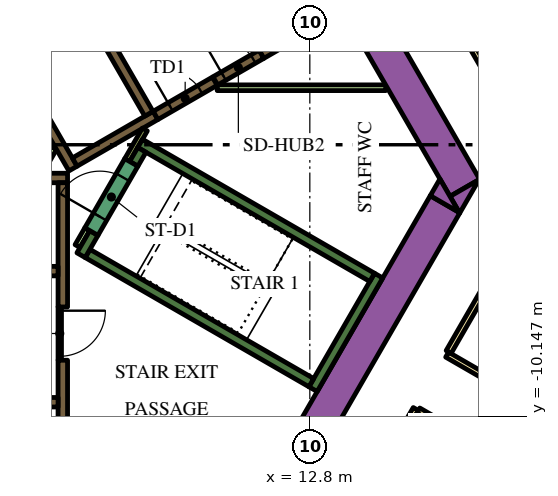
"""IFC4 building model, lengths in metres.
Left out: names, types, materials, properties, quantities, classifications, styles, units other than length and angle.
Written with IfcOpenShell. Run it as: python <this file> out.ifc"""

import sys

from ifc_helpers import new_model, si_unit, direction, frame, frame_2d, origin, place, context, subcontext, project, spatial, polyline, rectangle, outline, extrude, element, fill, save


model = new_model("IFC4")
c1 = context("Model", 3, precision=1e-05, world=origin(), true_north=direction((0.0, 1.0)))
c2 = subcontext(c1, "Body", "Model", "MODEL_VIEW")
j1 = project(units=[si_unit("LENGTHUNIT", "METRE"), si_unit("PLANEANGLEUNIT", "RADIAN")], contexts=[c1])
p1 = place(None, origin())
s1 = spatial("IfcSite", under=j1, at=p1, CompositionType="ELEMENT")
p2 = place(p1, origin())
s2 = spatial("IfcBuilding", under=s1, at=p2, CompositionType="ELEMENT")
p3 = place(p2, frame((0.0, 0.0, 91.5)))
s3 = spatial("IfcBuildingStorey", under=s2, at=p3, CompositionType="ELEMENT", Elevation=91.5)
p4 = place(p3, frame((6.776, 13.364, 0.0), z_axis=(0.0, 0.0, 1.0), x_axis=(0.500004177138, -0.8660229921, 0.0)))
e1 = element("IfcWall", 1, at=p4, inside=s3, PredefinedType="SOLIDWALL", context=c2, shape_type="SweptSolid", body=[
    extrude(rectangle(XDim=20.204, YDim=0.9, at=frame_2d((10.102, 0.0))), origin(), (0.0, 0.0, 1.0), 3.9),
])
p5 = place(p3, origin())
e2 = element("IfcWall", 2, at=p5, inside=s3, PredefinedType="SOLIDWALL", context=c2, shape_type="SweptSolid", body=[
    extrude(outline(polyline([(16.743, -4.8), (16.489, -4.36), (17.251, -3.92), (16.743, -4.8)])), origin(), (0.0, 0.0, 1.0), 3.9),
])
p6 = place(p3, frame((11.695, -12.644, 0.0), z_axis=(0.0, 0.0, 1.0), x_axis=(0.500010229568, 0.86601949766, 0.0)))
e3 = element("IfcWall", 3, at=p6, inside=s3, PredefinedType="SOLIDWALL", context=c2, shape_type="SweptSolid", body=[
    extrude(rectangle(XDim=9.326, YDim=0.9, at=frame_2d((4.663, 0.0))), origin(), (0.0, 0.0, 1.0), 3.9),
])
e4 = element("IfcWall", 4, at=p5, inside=s3, PredefinedType="SOLIDWALL", context=c2, shape_type="SweptSolid", body=[
    extrude(outline(polyline([(16.223, -3.9), (16.732, -4.78), (15.969, -4.34), (16.223, -3.9)])), origin(), (0.0, 0.0, 1.0), 3.9),
])
p7 = place(p3, frame((12.885, -9.431, 0.0), z_axis=(0.0, 0.0, 1.0), x_axis=(0.500020560727, 0.866013532718, 0.0)))
e5 = element("IfcWall", 5, at=p7, inside=s3, PredefinedType="SOLIDWALL", context=c2, shape_type="SweptSolid", body=[
    extrude(rectangle(XDim=3.45, YDim=0.25, at=frame_2d((1.725, 0.0))), origin(), (0.0, 0.0, 1.0), 3.9),
])
p8 = place(p3, frame((12.84, -9.261, 0.0), z_axis=(0.0, 0.0, 1.0), x_axis=(-0.866013990052, 0.500019768644, 0.0)))
e6 = element("IfcWall", 6, at=p8, inside=s3, PredefinedType="SOLIDWALL", context=c2, shape_type="SweptSolid", body=[
    extrude(rectangle(XDim=6.8, YDim=0.25, at=frame_2d((3.4, 0.0))), origin(), (0.0, 0.0, 1.0), 3.9),
])
p9 = place(p3, frame((6.78, -5.906, 0.0), z_axis=(0.0, 0.0, 1.0), x_axis=(0.500223362819, 0.865896406789, 0.0)))
e7 = element("IfcWall", 7, at=p9, inside=s3, PredefinedType="SOLIDWALL", context=c2, shape_type="SweptSolid", body=[
    extrude(rectangle(XDim=0.675, YDim=0.25, at=frame_2d((0.337, 0.0))), origin(), (0.0, 0.0, 1.0), 3.9),
])
p10 = place(p3, frame((8.334, -2.964, 0.0), z_axis=(0.0, 0.0, 1.0), x_axis=(0.866016039709, -0.500016218704, 0.0)))
e8 = element("IfcWall", 8, at=p10, inside=s3, PredefinedType="SOLIDWALL", context=c2, shape_type="SweptSolid", body=[
    extrude(rectangle(XDim=7.05, YDim=0.25, at=frame_2d((3.525, 0.0))), origin(), (0.0, 0.0, 1.0), 3.9),
])
p11 = place(p3, frame((8.168, -3.503, 0.0), z_axis=(0.0, 0.0, 1.0), x_axis=(0.49972245349, 0.866185586049, 0.0)))
e9 = element("IfcWall", 9, at=p11, inside=s3, PredefinedType="SOLIDWALL", context=c2, shape_type="SweptSolid", body=[
    extrude(rectangle(XDim=0.425, YDim=0.25, at=frame_2d((0.212, 0.0))), origin(), (0.0, 0.0, 1.0), 3.9),
])
p12 = place(p3, frame((-5.545, -3.875, 0.0), z_axis=(0.0, 0.0, 1.0), x_axis=(1.0, 0.0, 0.0)))
e10 = element("IfcWall", 10, at=p12, inside=s3, PredefinedType="SOLIDWALL", context=c2, shape_type="SweptSolid", body=[
    extrude(rectangle(XDim=11.97, YDim=0.25, at=frame_2d((5.985, 0.0))), origin(), (0.0, 0.0, 1.0), 3.9),
])
p13 = place(p3, frame((6.3, -8.67, 0.0), z_axis=(0.0, 0.0, 1.0), x_axis=(0.0, -1.0, 0.0)))
e11 = element("IfcWall", 11, at=p13, inside=s3, PredefinedType="SOLIDWALL", context=c2, shape_type="SweptSolid", body=[
    extrude(rectangle(XDim=3.43, YDim=0.25, at=frame_2d((1.715, 0.0))), origin(), (0.0, 0.0, 1.0), 3.9),
])
p14 = place(p3, frame((6.3, -7.268, 0.0), z_axis=(0.0, 0.0, 1.0), x_axis=(0.0, 1.0, 0.0)))
e12 = element("IfcWall", 12, at=p14, inside=s3, PredefinedType="SOLIDWALL", context=c2, shape_type="SweptSolid", body=[
    extrude(rectangle(XDim=3.268, YDim=0.25, at=frame_2d((1.634, 0.0))), origin(), (0.0, 0.0, 1.0), 3.9),
])
p15 = place(p3, frame((13.629, 0.594, 0.0), z_axis=(0.0, 0.0, 1.0), x_axis=(-0.866063384774, -0.499934209226, 0.0)))
e13 = element("IfcWall", 13, at=p15, inside=s3, PredefinedType="SOLIDWALL", context=c2, shape_type="SweptSolid", body=[
    extrude(rectangle(XDim=2.428, YDim=0.25, at=frame_2d((1.214, 0.0))), origin(), (0.0, 0.0, 1.0), 3.9),
])
e14 = element("IfcWall", 14, at=p5, inside=s3, PredefinedType="SOLIDWALL", context=c2, shape_type="SweptSolid", body=[
    extrude(outline(polyline([(0.566, 6.725), (0.566, 6.875), (0.566, 6.875), (0.565, 6.875), (0.361, 6.875), (0.035, 7.439), (0.252, 7.564), (0.377, 7.348), (6.552, -3.348), (6.677, -3.564), (6.46, -3.689), (0.448, 6.725), (0.565, 6.725), (0.566, 6.725), (0.566, 6.725)])), origin(), (0.0, 0.0, 1.0), 3.9),
])
p16 = place(p3, frame((6.614, -3.456, 0.0), z_axis=(0.0, 0.0, 1.0), x_axis=(0.866031582473, 0.499989298045, 0.0)))
e15 = element("IfcWall", 15, at=p16, inside=s3, PredefinedType="SOLIDWALL", context=c2, shape_type="SweptSolid", body=[
    extrude(rectangle(XDim=2.455, YDim=0.25, at=frame_2d((1.228, 0.0))), origin(), (0.0, 0.0, 1.0), 3.9),
])
p17 = place(p3, frame((6.945, -5.222, 0.0), z_axis=(0.0, 0.0, 1.0), x_axis=(-0.499818422106, -0.866130212453, 0.0)))
e16 = element("IfcWall", 16, at=p17, inside=s3, PredefinedType="PARTITIONING", context=c2, shape_type="SweptSolid", body=[
    extrude(rectangle(XDim=0.514, YDim=0.15, at=frame_2d((0.257, 0.0))), origin(), (0.0, 0.0, 1.0), 2.75),
])
p18 = place(p3, frame((5.705, -3.718, 0.0), z_axis=(0.0, 0.0, 1.0), x_axis=(0.499962090823, 0.866047289552, 0.0)))
e17 = element("IfcWall", 17, at=p18, inside=s3, PredefinedType="PARTITIONING", context=c2, shape_type="SweptSolid", body=[
    extrude(rectangle(XDim=0.735, YDim=0.15, at=frame_2d((0.367, 0.0))), origin(), (0.0, 0.0, 1.0), 2.75),
])
p19 = place(p3, frame((8.459, -2.599, 0.0), z_axis=(0.0, 0.0, 1.0), x_axis=(-0.500041054325, -0.866001699761, 0.0)))
e18 = element("IfcWall", 18, at=p19, inside=s3, PredefinedType="PARTITIONING", context=c2, shape_type="SweptSolid", body=[
    extrude(rectangle(XDim=0.929, YDim=0.15, at=frame_2d((0.464, 0.0))), origin(), (0.0, 0.0, 1.0), 3.9),
])
p20 = place(p3, frame((10.362, -1.5, 0.0), z_axis=(0.0, 0.0, 1.0), x_axis=(1.0, 0.0, 0.0)))
e19 = element("IfcWall", 19, at=p20, inside=s3, PredefinedType="PARTITIONING", context=c2, shape_type="SweptSolid", body=[
    extrude(rectangle(XDim=4.439, YDim=0.15, at=frame_2d((2.22, 0.0))), origin(), (0.0, 0.0, 1.0), 2.75),
])
p21 = place(p3, frame((-6.175, -9.775, 0.0), z_axis=(0.0, 0.0, 1.0), x_axis=(1.0, 0.0, 0.0)))
e20 = element("IfcWall", 20, at=p21, inside=s3, PredefinedType="SOLIDWALL", context=c2, shape_type="SweptSolid", body=[
    extrude(rectangle(XDim=12.35, YDim=0.25, at=frame_2d((6.175, 0.0))), origin(), (0.0, 0.0, 1.0), 3.9),
])
p22 = place(p21, frame((0.585, 0.0, 0.0)))
e21 = element("IfcOpeningElement", 21, at=p22, cuts=e20, PredefinedType="OPENING", context=c2, shape_type="SweptSolid", body=[
    extrude(rectangle(XDim=1.1, YDim=2.1, at=frame_2d((0.55, 1.05))), frame((0.0, 0.135, 0.0), z_axis=(0.0, -1.0, 0.0), x_axis=(1.0, 0.0, 0.0)), (0.0, 0.0, 1.0), 0.27),
])
p23 = place(p21, frame((3.105, 0.0, 0.0)))
e22 = element("IfcOpeningElement", 22, at=p23, cuts=e20, PredefinedType="OPENING", context=c2, shape_type="SweptSolid", body=[
    extrude(rectangle(XDim=1.1, YDim=2.1, at=frame_2d((0.55, 1.05))), frame((0.0, 0.135, 0.0), z_axis=(0.0, -1.0, 0.0), x_axis=(1.0, 0.0, 0.0)), (0.0, 0.0, 1.0), 0.27),
])
p24 = place(p21, frame((5.625, 0.0, 0.0)))
e23 = element("IfcOpeningElement", 23, at=p24, cuts=e20, PredefinedType="OPENING", context=c2, shape_type="SweptSolid", body=[
    extrude(rectangle(XDim=1.1, YDim=2.1, at=frame_2d((0.55, 1.05))), frame((0.0, 0.135, 0.0), z_axis=(0.0, -1.0, 0.0), x_axis=(1.0, 0.0, 0.0)), (0.0, 0.0, 1.0), 0.27),
])
p25 = place(p21, frame((8.145, 0.0, 0.0)))
e24 = element("IfcOpeningElement", 24, at=p25, cuts=e20, PredefinedType="OPENING", context=c2, shape_type="SweptSolid", body=[
    extrude(rectangle(XDim=1.1, YDim=2.1, at=frame_2d((0.55, 1.05))), frame((0.0, 0.135, 0.0), z_axis=(0.0, -1.0, 0.0), x_axis=(1.0, 0.0, 0.0)), (0.0, 0.0, 1.0), 0.27),
])
p26 = place(p21, frame((10.665, 0.0, 0.0)))
e25 = element("IfcOpeningElement", 25, at=p26, cuts=e20, PredefinedType="OPENING", context=c2, shape_type="SweptSolid", body=[
    extrude(rectangle(XDim=1.1, YDim=2.1, at=frame_2d((0.55, 1.05))), frame((0.0, 0.135, 0.0), z_axis=(0.0, -1.0, 0.0), x_axis=(1.0, 0.0, 0.0)), (0.0, 0.0, 1.0), 0.27),
])
p27 = place(p3, frame((-6.175, -6.325, 0.0), z_axis=(0.0, 0.0, 1.0), x_axis=(1.0, 0.0, 0.0)))
e26 = element("IfcWall", 26, at=p27, inside=s3, PredefinedType="SOLIDWALL", context=c2, shape_type="SweptSolid", body=[
    extrude(rectangle(XDim=12.35, YDim=0.25, at=frame_2d((6.175, 0.0))), origin(), (0.0, 0.0, 1.0), 3.9),
])
p28 = place(p27, frame((3.205, 0.0, 0.0)))
e27 = element("IfcOpeningElement", 27, at=p28, cuts=e26, PredefinedType="OPENING", context=c2, shape_type="SweptSolid", body=[
    extrude(rectangle(XDim=0.9, YDim=2.1, at=frame_2d((0.45, 1.05))), frame((0.0, 0.135, 0.0), z_axis=(0.0, -1.0, 0.0), x_axis=(1.0, 0.0, 0.0)), (0.0, 0.0, 1.0), 0.27),
])
p29 = place(p27, frame((8.145, 0.0, 0.0)))
e28 = element("IfcOpeningElement", 28, at=p29, cuts=e26, PredefinedType="OPENING", context=c2, shape_type="SweptSolid", body=[
    extrude(rectangle(XDim=1.1, YDim=2.1, at=frame_2d((0.55, 1.05))), frame((0.0, 0.135, 0.0), z_axis=(0.0, -1.0, 0.0), x_axis=(1.0, 0.0, 0.0)), (0.0, 0.0, 1.0), 0.27),
])
p30 = place(p27, frame((10.665, 0.0, 0.0)))
e29 = element("IfcOpeningElement", 29, at=p30, cuts=e26, PredefinedType="OPENING", context=c2, shape_type="SweptSolid", body=[
    extrude(rectangle(XDim=1.1, YDim=2.1, at=frame_2d((0.55, 1.05))), frame((0.0, 0.135, 0.0), z_axis=(0.0, -1.0, 0.0), x_axis=(1.0, 0.0, 0.0)), (0.0, 0.0, 1.0), 0.27),
])
p31 = place(p3, frame((8.565, -2.185, 0.0), z_axis=(0.0, 0.0, 1.0), x_axis=(-0.499997954832, 0.866026584559, 0.0)))
e30 = element("IfcWall", 30, at=p31, inside=s3, PredefinedType="SOLIDWALL", context=c2, shape_type="SweptSolid", body=[
    extrude(rectangle(XDim=12.35, YDim=0.25, at=frame_2d((6.175, 0.0))), origin(), (0.0, 0.0, 1.0), 3.9),
])
p32 = place(p31, frame((5.725, 0.0, 0.0)))
e31 = element("IfcOpeningElement", 31, at=p32, cuts=e30, PredefinedType="OPENING", context=c2, shape_type="SweptSolid", body=[
    extrude(rectangle(XDim=0.9, YDim=2.1, at=frame_2d((0.45, 1.05))), frame((0.0, 0.135, 0.0), z_axis=(0.0, -1.0, 0.0), x_axis=(1.0, 0.0, 0.0)), (0.0, 0.0, 1.0), 0.27),
])
p33 = place(p3, frame((7.053, -5.284, 0.0), z_axis=(0.0, 0.0, 1.0), x_axis=(0.500078061341, 0.865980330357, 0.0)))
e32 = element("IfcWall", 32, at=p33, inside=s3, PredefinedType="SOLIDWALL", context=c2, shape_type="SweptSolid", body=[
    extrude(rectangle(XDim=2.1, YDim=0.4, at=frame_2d((1.05, 0.0))), origin(), (0.0, 0.0, 1.0), 3.9),
])
p34 = place(p33, frame((0.45, 0.0, 0.0)))
e33 = element("IfcOpeningElement", 33, at=p34, cuts=e32, PredefinedType="OPENING", context=c2, shape_type="SweptSolid", body=[
    extrude(rectangle(XDim=1.2, YDim=2.1, at=frame_2d((0.6, 1.05))), frame((0.0, 0.21, 0.0), z_axis=(0.0, -1.0, 0.0), x_axis=(1.0, 0.0, 0.0)), (0.0, 0.0, 1.0), 0.42),
])
p35 = place(p3, frame((8.74, -2.229, 0.0), z_axis=(0.0, 0.0, 1.0), x_axis=(0.865989075817, 0.500062916607, 0.0)))
e34 = element("IfcWall", 34, at=p35, inside=s3, PredefinedType="SOLIDWALL", context=c2, shape_type="SweptSolid", body=[
    extrude(rectangle(XDim=1.8, YDim=0.25, at=frame_2d((0.9, 0.0))), origin(), (0.0, 0.0, 1.0), 3.9),
])
p36 = place(p35, frame((0.45, 0.0, 0.0)))
e35 = element("IfcOpeningElement", 35, at=p36, cuts=e34, PredefinedType="OPENING", context=c2, shape_type="SweptSolid", body=[
    extrude(rectangle(XDim=0.9, YDim=2.1, at=frame_2d((0.45, 1.05))), frame((0.0, 0.135, 0.0), z_axis=(0.0, -1.0, 0.0), x_axis=(1.0, 0.0, 0.0)), (0.0, 0.0, 1.0), 0.27),
])
p37 = place(p3, frame((6.22, -7.266, 0.0), z_axis=(0.0, 0.0, 1.0), x_axis=(0.0, -1.0, 0.0)))
e36 = element("IfcWall", 36, at=p37, inside=s3, PredefinedType="PARTITIONING", context=c2, shape_type="SweptSolid", body=[
    extrude(rectangle(XDim=1.4, YDim=0.09, at=frame_2d((0.7, 0.0))), origin(), (0.0, 0.0, 1.0), 2.75),
])
p38 = place(p37, frame((0.1, 0.0, 0.0)))
e37 = element("IfcOpeningElement", 37, at=p38, cuts=e36, PredefinedType="OPENING", context=c2, shape_type="SweptSolid", body=[
    extrude(rectangle(XDim=1.2, YDim=2.1, at=frame_2d((0.6, 1.05))), frame((0.0, 0.055, 0.0), z_axis=(0.0, -1.0, 0.0), x_axis=(1.0, 0.0, 0.0)), (0.0, 0.0, 1.0), 0.11),
])
p39 = place(p3, frame((10.313, -1.32, 0.0), z_axis=(0.0, 0.0, 1.0), x_axis=(0.866034573852, 0.49998411664, 0.0)))
e38 = element("IfcWall", 38, at=p39, inside=s3, PredefinedType="SOLIDWALL", context=c2, shape_type="SweptSolid", body=[
    extrude(rectangle(XDim=1.4, YDim=0.25, at=frame_2d((0.7, 0.0))), origin(), (0.0, 0.0, 1.0), 3.9),
])
p40 = place(p39, frame((0.25, 0.0, 0.0)))
e39 = element("IfcOpeningElement", 39, at=p40, cuts=e38, PredefinedType="OPENING", context=c2, shape_type="SweptSolid", body=[
    extrude(rectangle(XDim=0.9, YDim=2.1, at=frame_2d((0.45, 1.05))), frame((0.0, 0.135, 0.0), z_axis=(0.0, -1.0, 0.0), x_axis=(1.0, 0.0, 0.0)), (0.0, 0.0, 1.0), 0.27),
])
p41 = place(p3, frame((16.412, -8.523, 0.0), z_axis=(0.0, 0.0, 1.0), x_axis=(0.866025629663, -0.499999608766, 0.0)))
e40 = element("IfcWall", 40, at=p41, inside=s3, PredefinedType="PARTITIONING", context=c2, shape_type="SweptSolid", body=[
    extrude(rectangle(XDim=13.624, YDim=0.15, at=frame_2d((6.812, 0.0))), origin(), (0.0, 0.0, 1.0), 2.75),
])
p42 = place(p41, frame((4.134, 0.0, 0.0)))
e41 = element("IfcOpeningElement", 41, at=p42, cuts=e40, PredefinedType="OPENING", context=c2, shape_type="SweptSolid", body=[
    extrude(rectangle(XDim=1.0, YDim=2.1, at=frame_2d((0.5, 1.05))), frame((0.0, 0.085, 0.0), z_axis=(0.0, -1.0, 0.0), x_axis=(1.0, 0.0, 0.0)), (0.0, 0.0, 1.0), 0.17),
])
p43 = place(p3, frame((19.081, -3.9, 0.0), z_axis=(0.0, 0.0, 1.0), x_axis=(-0.499974327079, -0.866040225545, 0.0)))
e42 = element("IfcWall", 42, at=p43, inside=s3, PredefinedType="PARTITIONING", context=c2, shape_type="SweptSolid", body=[
    extrude(rectangle(XDim=5.258, YDim=0.15, at=frame_2d((2.629, 0.0))), origin(), (0.0, 0.0, 1.0), 2.75),
])
p44 = place(p43, frame((0.18, 0.0, 0.0)))
e43 = element("IfcOpeningElement", 43, at=p44, cuts=e42, PredefinedType="OPENING", context=c2, shape_type="SweptSolid", body=[
    extrude(rectangle(XDim=1.0, YDim=2.1, at=frame_2d((0.5, 1.05))), frame((0.0, 0.085, 0.0), z_axis=(0.0, -1.0, 0.0), x_axis=(1.0, 0.0, 0.0)), (0.0, 0.0, 1.0), 0.17),
])
p45 = place(p3, frame((6.163, 18.475, 0.0), z_axis=(0.0, 0.0, 1.0), x_axis=(0.500001317485, -0.866024643133, 0.0)))
e44 = element("IfcWall", 44, at=p45, inside=s3, PredefinedType="PARTITIONING", context=c2, shape_type="SweptSolid", body=[
    extrude(rectangle(XDim=25.767, YDim=0.15, at=frame_2d((12.883, 0.0))), origin(), (0.0, 0.0, 1.0), 2.75),
])
p46 = place(p45, frame((24.241, 0.0, 0.0)))
e45 = element("IfcOpeningElement", 45, at=p46, cuts=e44, PredefinedType="OPENING", context=c2, shape_type="SweptSolid", body=[
    extrude(rectangle(XDim=1.0, YDim=2.1, at=frame_2d((0.5, 1.05))), frame((0.0, 0.085, 0.0), z_axis=(0.0, -1.0, 0.0), x_axis=(1.0, 0.0, 0.0)), (0.0, 0.0, 1.0), 0.17),
])
p47 = place(p45, frame((13.144, 0.0, 0.0)))
e46 = element("IfcOpeningElement", 46, at=p47, cuts=e44, PredefinedType="OPENING", context=c2, shape_type="SweptSolid", body=[
    extrude(rectangle(XDim=1.0, YDim=2.1, at=frame_2d((0.5, 1.05))), frame((0.0, 0.085, 0.0), z_axis=(0.0, -1.0, 0.0), x_axis=(1.0, 0.0, 0.0)), (0.0, 0.0, 1.0), 0.17),
])
p48 = place(p45, frame((10.874, 0.0, 0.0)))
e47 = element("IfcOpeningElement", 47, at=p48, cuts=e44, PredefinedType="OPENING", context=c2, shape_type="SweptSolid", body=[
    extrude(rectangle(XDim=0.9, YDim=2.1, at=frame_2d((0.45, 1.05))), frame((0.0, 0.085, 0.0), z_axis=(0.0, -1.0, 0.0), x_axis=(1.0, 0.0, 0.0)), (0.0, 0.0, 1.0), 0.17),
])
p49 = place(p45, frame((3.718, 0.0, 0.0)))
e48 = element("IfcOpeningElement", 48, at=p49, cuts=e44, PredefinedType="OPENING", context=c2, shape_type="SweptSolid", body=[
    extrude(rectangle(XDim=1.1, YDim=2.1, at=frame_2d((0.55, 1.05))), frame((0.0, 0.085, 0.0), z_axis=(0.0, -1.0, 0.0), x_axis=(1.0, 0.0, 0.0)), (0.0, 0.0, 1.0), 0.17),
])
p50 = place(p45, frame((2.411, 0.0, 0.0)))
e49 = element("IfcOpeningElement", 49, at=p50, cuts=e44, PredefinedType="OPENING", context=c2, shape_type="SweptSolid", body=[
    extrude(rectangle(XDim=1.0, YDim=2.1, at=frame_2d((0.5, 1.05))), frame((0.0, 0.085, 0.0), z_axis=(0.0, -1.0, 0.0), x_axis=(1.0, 0.0, 0.0)), (0.0, 0.0, 1.0), 0.17),
])
p51 = place(p3, frame((15.587, -9.952, 0.0), z_axis=(0.0, 0.0, 1.0), x_axis=(-0.500016618951, -0.866015808616, 0.0)))
e50 = element("IfcWall", 50, at=p51, inside=s3, PredefinedType="PARTITIONING", context=c2, shape_type="SweptSolid", body=[
    extrude(rectangle(XDim=5.268, YDim=0.15, at=frame_2d((2.634, 0.0))), origin(), (0.0, 0.0, 1.0), 2.75),
])
p52 = place(p3, frame((27.386, -16.764, 0.0), z_axis=(0.0, 0.0, 1.0), x_axis=(-0.866022585856, 0.500004880763, 0.0)))
e51 = element("IfcWall", 51, at=p52, inside=s3, PredefinedType="PARTITIONING", context=c2, shape_type="SweptSolid", body=[
    extrude(rectangle(XDim=13.544, YDim=0.15, at=frame_2d((6.772, 0.0))), origin(), (0.0, 0.0, 1.0), 2.75),
])
p53 = place(p52, frame((12.214, 0.0, 0.0)))
e52 = element("IfcOpeningElement", 52, at=p53, cuts=e51, PredefinedType="OPENING", context=c2, shape_type="SweptSolid", body=[
    extrude(rectangle(XDim=1.0, YDim=2.1, at=frame_2d((0.5, 1.05))), frame((0.0, 0.085, 0.0), z_axis=(0.0, -1.0, 0.0), x_axis=(1.0, 0.0, 0.0)), (0.0, 0.0, 1.0), 0.17),
])
p54 = place(p52, frame((8.49, 0.0, 0.0)))
e53 = element("IfcOpeningElement", 53, at=p54, cuts=e51, PredefinedType="OPENING", context=c2, shape_type="SweptSolid", body=[
    extrude(rectangle(XDim=1.0, YDim=2.1, at=frame_2d((0.5, 1.05))), frame((0.0, 0.085, 0.0), z_axis=(0.0, -1.0, 0.0), x_axis=(1.0, 0.0, 0.0)), (0.0, 0.0, 1.0), 0.17),
])
p55 = place(p34, origin())
e54 = element("IfcDoor", 54, at=p55, inside=s3, OperationType="SINGLE_SWING_LEFT", PredefinedType="DOOR", context=c2, shape_type="SweptSolid", body=[
    extrude(rectangle(XDim=1.2, YDim=2.1, at=frame_2d((0.6, 1.05))), frame((0.0, 0.025, 0.0), z_axis=(0.0, -1.0, 0.0), x_axis=(1.0, 0.0, 0.0)), (0.0, 0.0, 1.0), 0.05),
])
fill(e33, e54)
p56 = place(p36, origin())
e55 = element("IfcDoor", 55, at=p56, inside=s3, OperationType="SINGLE_SWING_LEFT", PredefinedType="DOOR", context=c2, shape_type="SweptSolid", body=[
    extrude(rectangle(XDim=0.9, YDim=2.1, at=frame_2d((0.45, 1.05))), frame((0.0, 0.025, 0.0), z_axis=(0.0, -1.0, 0.0), x_axis=(1.0, 0.0, 0.0)), (0.0, 0.0, 1.0), 0.05),
])
fill(e35, e55)
p57 = place(p38, origin())
e56 = element("IfcDoor", 56, at=p57, inside=s3, OperationType="SINGLE_SWING_LEFT", PredefinedType="DOOR", context=c2, shape_type="SweptSolid", body=[
    extrude(rectangle(XDim=1.2, YDim=2.1, at=frame_2d((0.6, 1.05))), frame((0.0, 0.025, 0.0), z_axis=(0.0, -1.0, 0.0), x_axis=(1.0, 0.0, 0.0)), (0.0, 0.0, 1.0), 0.05),
])
fill(e37, e56)
p58 = place(p40, origin())
e57 = element("IfcDoor", 57, at=p58, inside=s3, OperationType="SINGLE_SWING_LEFT", PredefinedType="DOOR", context=c2, shape_type="SweptSolid", body=[
    extrude(rectangle(XDim=0.9, YDim=2.1, at=frame_2d((0.45, 1.05))), frame((0.0, 0.025, 0.0), z_axis=(0.0, -1.0, 0.0), x_axis=(1.0, 0.0, 0.0)), (0.0, 0.0, 1.0), 0.05),
])
fill(e39, e57)
p59 = place(p53, origin())
e58 = element("IfcDoor", 58, at=p59, inside=s3, OperationType="SINGLE_SWING_RIGHT", PredefinedType="DOOR", context=c2, shape_type="SweptSolid", body=[
    extrude(rectangle(XDim=1.0, YDim=2.1, at=frame_2d((0.5, 1.05))), frame((0.0, 0.025, 0.0), z_axis=(0.0, -1.0, 0.0), x_axis=(1.0, 0.0, 0.0)), (0.0, 0.0, 1.0), 0.05),
])
fill(e52, e58)
save(model, sys.argv[1])
